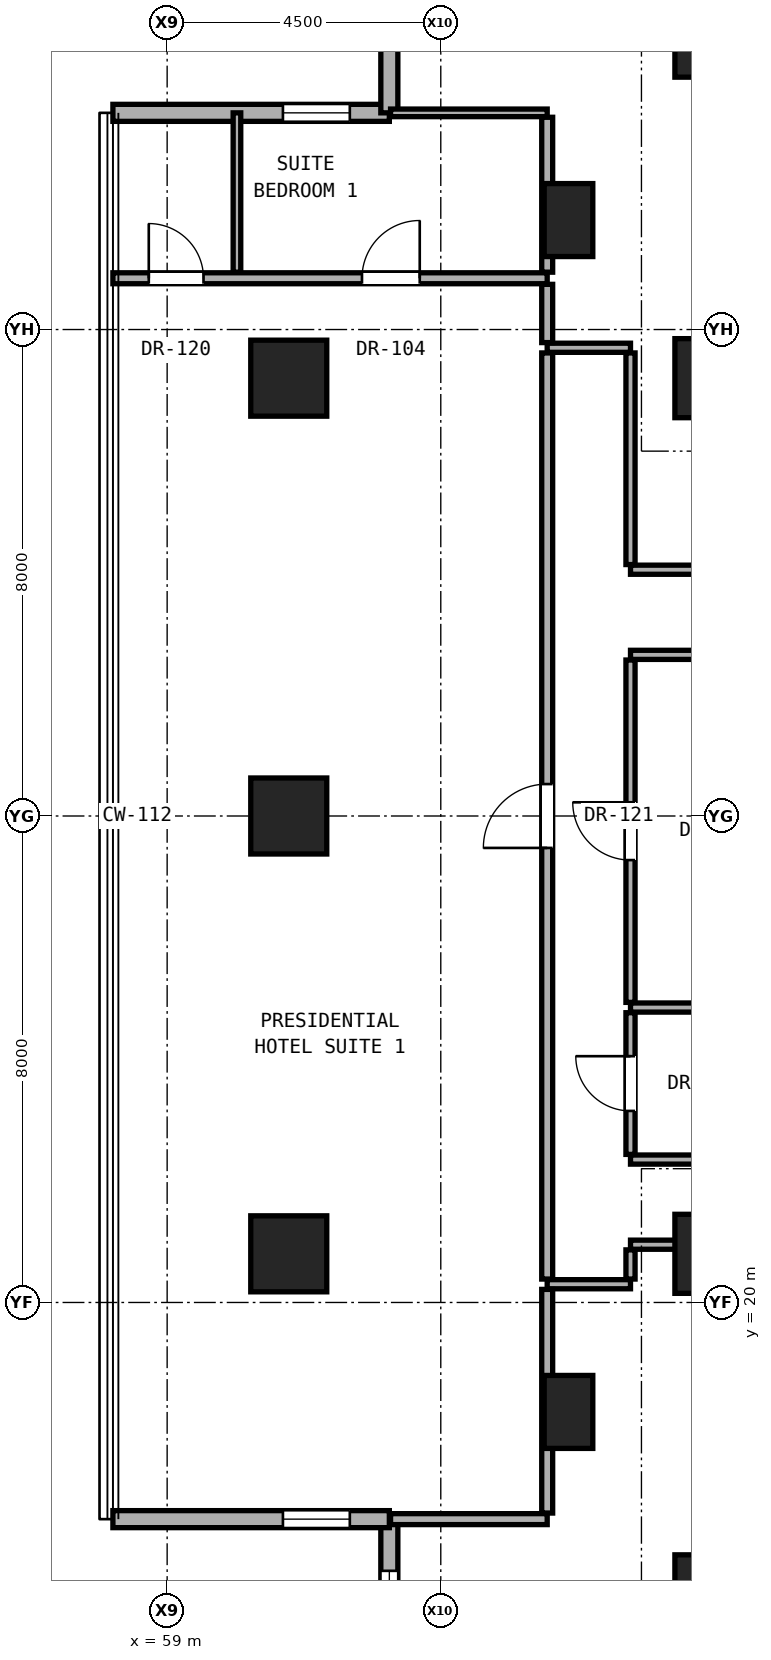
"""IFC4 building model, lengths in metres.
Left out: names, types, materials, properties, quantities, classifications, styles, units other than length and angle.
Written with IfcOpenShell. Run it as: python <this file> out.ifc"""

import sys

from ifc_helpers import new_model, si_unit, direction, frame, frame_2d, origin, origin_2d, place, context, subcontext, project, spatial, rectangle, hollow_rectangle, extrude, element, fill, save


model = new_model("IFC4")
c1 = context("Model", 3, precision=1e-05, world=origin(), true_north=direction((0.0, 1.0)))
c2 = subcontext(c1, "Body", "Model", "MODEL_VIEW")
j1 = project(units=[si_unit("LENGTHUNIT", "METRE"), si_unit("PLANEANGLEUNIT", "RADIAN")], contexts=[c1])
p1 = place(None, origin())
s1 = spatial("IfcSite", under=j1, at=p1, CompositionType="ELEMENT")
p2 = place(p1, origin())
s2 = spatial("IfcBuilding", under=s1, at=p2, CompositionType="ELEMENT")
p3 = place(p2, frame((0.0, 0.0, 65.3)))
s3 = spatial("IfcBuildingStorey", under=s2, at=p3, CompositionType="ELEMENT", Elevation=65.3)
for number, where, z_axis, x_axis in (
    (1, (68.0, 15.2, 0.0), (0.0, 0.0, 1.0), (1.0, 0.0, 0.0)),
    (2, (68.0, 20.8, 0.0), (0.0, 0.0, 1.0), (1.0, 0.0, 0.0)),
    (3, (68.0, 35.2, 0.0), (0.0, 0.0, 1.0), (1.0, 0.0, 0.0)),
    (4, (68.0, 40.8, 0.0), (0.0, 0.0, 1.0), (1.0, 0.0, 0.0)),
):
    element("IfcColumn", number, at=place(p3, frame(where, z_axis=z_axis, x_axis=x_axis)), inside=s3, PredefinedType="COLUMN", context=c2, shape_type="SweptSolid", body=[
        extrude(rectangle(XDim=1.3, YDim=1.3, at=origin_2d()), origin(), (0.0, 0.0, 1.0), 3.3),
    ])
for number, where, z_axis, x_axis in (
    (5, (61.0, 20.8, 0.0), (0.0, 0.0, 1.0), (1.0, 0.0, 0.0)),
    (6, (61.0, 28.0, 0.0), (0.0, 0.0, 1.0), (1.0, 0.0, 0.0)),
    (7, (61.0, 35.2, 0.0), (0.0, 0.0, 1.0), (1.0, 0.0, 0.0)),
):
    element("IfcColumn", number, at=place(p3, frame(where, z_axis=z_axis, x_axis=x_axis)), inside=s3, PredefinedType="COLUMN", context=c2, shape_type="SweptSolid", body=[
        extrude(hollow_rectangle(XDim=1.25, YDim=1.25, WallThickness=0.07, at=origin_2d()), origin(), (0.0, 0.0, 1.0), 3.3),
    ])
for number, where, z_axis, x_axis in (
    (8, (65.6, 18.2, 0.0), (0.0, 0.0, 1.0), (1.0, 0.0, 0.0)),
    (9, (65.6, 37.8, 0.0), (0.0, 0.0, 1.0), (1.0, 0.0, 0.0)),
):
    element("IfcColumn", number, at=place(p3, frame(where, z_axis=z_axis, x_axis=x_axis)), inside=s3, PredefinedType="PILASTER", context=c2, shape_type="SweptSolid", body=[
        extrude(rectangle(XDim=0.8, YDim=1.2, at=origin_2d()), origin(), (0.0, 0.0, 1.0), 3.3),
    ])
p4 = place(p3, frame((62.654, 16.437, 0.0), z_axis=(0.0, 0.0, 1.0), x_axis=(0.0, -1.0, 0.0)))
e10 = element("IfcWall", 10, at=p4, inside=s3, PredefinedType="SOLIDWALL", context=c2, shape_type="SweptSolid", body=[
    extrude(rectangle(XDim=4.546, YDim=0.28, at=frame_2d((2.273, 0.0))), origin(), (0.0, 0.0, 1.0), 3.04),
])
p5 = place(p4, frame((0.85, 0.0, 0.79)))
e11 = element("IfcOpeningElement", 11, at=p5, cuts=e10, PredefinedType="OPENING", context=c2, shape_type="SweptSolid", body=[
    extrude(rectangle(XDim=1.8, YDim=2.1, at=frame_2d((0.9, 1.05))), frame((0.0, 0.15, 0.0), z_axis=(0.0, -1.0, 0.0), x_axis=(1.0, 0.0, 0.0)), (0.0, 0.0, 1.0), 0.3),
])
p6 = place(p3, frame((58.108, 16.437, 0.0), z_axis=(0.0, 0.0, 1.0), x_axis=(1.0, 0.0, 0.0)))
e12 = element("IfcWall", 12, at=p6, inside=s3, PredefinedType="SOLIDWALL", context=c2, shape_type="SweptSolid", body=[
    extrude(rectangle(XDim=4.546, YDim=0.28, at=frame_2d((2.273, 0.0))), origin(), (0.0, 0.0, 1.0), 3.04),
])
p7 = place(p6, frame((2.796, 0.0, 0.85)))
e13 = element("IfcOpeningElement", 13, at=p7, cuts=e12, PredefinedType="OPENING", context=c2, shape_type="SweptSolid", body=[
    extrude(rectangle(XDim=1.1, YDim=2.0, at=frame_2d((0.55, 1.0))), frame((0.0, 0.15, 0.0), z_axis=(0.0, -1.0, 0.0), x_axis=(1.0, 0.0, 0.0)), (0.0, 0.0, 1.0), 0.3),
])
p8 = place(p3, frame((62.654, 39.563, 0.0), z_axis=(0.0, 0.0, 1.0), x_axis=(-1.0, 0.0, 0.0)))
e14 = element("IfcWall", 14, at=p8, inside=s3, PredefinedType="SOLIDWALL", context=c2, shape_type="SweptSolid", body=[
    extrude(rectangle(XDim=4.546, YDim=0.28, at=frame_2d((2.273, 0.0))), origin(), (0.0, 0.0, 1.0), 3.04),
])
p9 = place(p8, frame((0.65, 0.0, 0.85)))
e15 = element("IfcOpeningElement", 15, at=p9, cuts=e14, PredefinedType="OPENING", context=c2, shape_type="SweptSolid", body=[
    extrude(rectangle(XDim=1.1, YDim=2.0, at=frame_2d((0.55, 1.0))), frame((0.0, 0.15, 0.0), z_axis=(0.0, -1.0, 0.0), x_axis=(1.0, 0.0, 0.0)), (0.0, 0.0, 1.0), 0.3),
])
p10 = place(p3, frame((62.654, 44.109, 0.0), z_axis=(0.0, 0.0, 1.0), x_axis=(0.0, -1.0, 0.0)))
e16 = element("IfcWall", 16, at=p10, inside=s3, PredefinedType="SOLIDWALL", context=c2, shape_type="SweptSolid", body=[
    extrude(rectangle(XDim=4.546, YDim=0.28, at=frame_2d((2.273, 0.0))), origin(), (0.0, 0.0, 1.0), 3.04),
])
p11 = place(p3, frame((62.674, 16.437, 0.0), z_axis=(0.0, 0.0, 1.0), x_axis=(1.0, 0.0, 0.0)))
e17 = element("IfcWall", 17, at=p11, inside=s3, PredefinedType="PARTITIONING", context=c2, shape_type="SweptSolid", body=[
    extrude(rectangle(XDim=2.576, YDim=0.18, at=frame_2d((1.288, 0.0))), origin(), (0.0, 0.0, 1.0), 3.06),
])
p12 = place(p3, frame((65.25, 20.3, 0.0), z_axis=(0.0, 0.0, 1.0), x_axis=(1.0, 0.0, 0.0)))
e18 = element("IfcWall", 18, at=p12, inside=s3, PredefinedType="PARTITIONING", context=c2, shape_type="SweptSolid", body=[
    extrude(rectangle(XDim=1.37, YDim=0.15, at=frame_2d((0.685, 0.0))), origin(), (0.0, 0.0, 1.0), 3.06),
])
p13 = place(p3, frame((66.62, 20.95, 0.0), z_axis=(0.0, 0.0, 1.0), x_axis=(1.0, 0.0, 0.0)))
e19 = element("IfcWall", 19, at=p13, inside=s3, PredefinedType="PARTITIONING", context=c2, shape_type="SweptSolid", body=[
    extrude(rectangle(XDim=1.06, YDim=0.15, at=frame_2d((0.53, 0.0))), origin(), (0.0, 0.0, 1.0), 2.452),
])
p14 = place(p3, frame((66.62, 22.35, 0.0), z_axis=(0.0, 0.0, 1.0), x_axis=(1.0, 0.0, 0.0)))
e20 = element("IfcWall", 20, at=p14, inside=s3, PredefinedType="PARTITIONING", context=c2, shape_type="SweptSolid", body=[
    extrude(rectangle(XDim=19.63, YDim=0.15, at=frame_2d((9.815, 0.0))), origin(), (0.0, 0.0, 1.0), 2.125),
])
p15 = place(p14, frame((8.981, 0.0, 0.0)))
e21 = element("IfcOpeningElement", 21, at=p15, cuts=e20, PredefinedType="OPENING", context=c2, shape_type="SweptSolid", body=[
    extrude(rectangle(XDim=0.85, YDim=2.01, at=frame_2d((0.425, 1.005))), frame((0.0, 0.085, 0.0), z_axis=(0.0, -1.0, 0.0), x_axis=(1.0, 0.0, 0.0)), (0.0, 0.0, 1.0), 0.17),
])
p16 = place(p14, frame((16.061, 0.0, 0.0)))
e22 = element("IfcOpeningElement", 22, at=p16, cuts=e20, PredefinedType="OPENING", context=c2, shape_type="SweptSolid", body=[
    extrude(rectangle(XDim=0.85, YDim=2.01, at=frame_2d((0.425, 1.005))), frame((0.0, 0.085, 0.0), z_axis=(0.0, -1.0, 0.0), x_axis=(1.0, 0.0, 0.0)), (0.0, 0.0, 1.0), 0.17),
])
p17 = place(p3, frame((66.62, 24.85, 0.0), z_axis=(0.0, 0.0, 1.0), x_axis=(1.0, 0.0, 0.0)))
e23 = element("IfcWall", 23, at=p17, inside=s3, PredefinedType="PARTITIONING", context=c2, shape_type="SweptSolid", body=[
    extrude(rectangle(XDim=3.13, YDim=0.15, at=frame_2d((1.565, 0.0))), origin(), (0.0, 0.0, 1.0), 2.125),
])
p18 = place(p3, frame((66.62, 30.65, 0.0), z_axis=(0.0, 0.0, 1.0), x_axis=(1.0, 0.0, 0.0)))
e24 = element("IfcWall", 24, at=p18, inside=s3, PredefinedType="PARTITIONING", context=c2, shape_type="SweptSolid", body=[
    extrude(rectangle(XDim=19.63, YDim=0.15, at=frame_2d((9.815, 0.0))), origin(), (0.0, 0.0, 1.0), 2.125),
])
p19 = place(p18, frame((3.855, 0.0, 0.0)))
e25 = element("IfcOpeningElement", 25, at=p19, cuts=e24, PredefinedType="OPENING", context=c2, shape_type="SweptSolid", body=[
    extrude(rectangle(XDim=0.85, YDim=2.01, at=frame_2d((0.425, 1.005))), frame((0.0, 0.085, 0.0), z_axis=(0.0, -1.0, 0.0), x_axis=(1.0, 0.0, 0.0)), (0.0, 0.0, 1.0), 0.17),
])
p20 = place(p18, frame((8.981, 0.0, 0.0)))
e26 = element("IfcOpeningElement", 26, at=p20, cuts=e24, PredefinedType="OPENING", context=c2, shape_type="SweptSolid", body=[
    extrude(rectangle(XDim=0.85, YDim=2.01, at=frame_2d((0.425, 1.005))), frame((0.0, 0.085, 0.0), z_axis=(0.0, -1.0, 0.0), x_axis=(1.0, 0.0, 0.0)), (0.0, 0.0, 1.0), 0.17),
])
p21 = place(p18, frame((16.061, 0.0, 0.0)))
e27 = element("IfcOpeningElement", 27, at=p21, cuts=e24, PredefinedType="OPENING", context=c2, shape_type="SweptSolid", body=[
    extrude(rectangle(XDim=0.85, YDim=2.01, at=frame_2d((0.425, 1.005))), frame((0.0, 0.085, 0.0), z_axis=(0.0, -1.0, 0.0), x_axis=(1.0, 0.0, 0.0)), (0.0, 0.0, 1.0), 0.17),
])
p22 = place(p3, frame((66.62, 32.05, 0.0), z_axis=(0.0, 0.0, 1.0), x_axis=(1.0, 0.0, 0.0)))
e28 = element("IfcWall", 28, at=p22, inside=s3, PredefinedType="PARTITIONING", context=c2, shape_type="SweptSolid", body=[
    extrude(rectangle(XDim=2.18, YDim=0.15, at=frame_2d((1.09, 0.0))), origin(), (0.0, 0.0, 1.0), 2.125),
])
p23 = place(p3, frame((65.25, 35.7, 0.0), z_axis=(0.0, 0.0, 1.0), x_axis=(1.0, 0.0, 0.0)))
e29 = element("IfcWall", 29, at=p23, inside=s3, PredefinedType="PARTITIONING", context=c2, shape_type="SweptSolid", body=[
    extrude(rectangle(XDim=1.37, YDim=0.15, at=frame_2d((0.685, 0.0))), origin(), (0.0, 0.0, 1.0), 3.06),
])
p24 = place(p3, frame((58.108, 36.843, 0.0), z_axis=(0.0, 0.0, 1.0), x_axis=(1.0, 0.0, 0.0)))
e30 = element("IfcWall", 30, at=p24, inside=s3, PredefinedType="PARTITIONING", context=c2, shape_type="SweptSolid", body=[
    extrude(rectangle(XDim=7.142, YDim=0.18, at=frame_2d((3.571, 0.0))), origin(), (0.0, 0.0, 1.0), 2.436),
])
p25 = place(p24, frame((4.096, 0.0, 0.0)))
e31 = element("IfcOpeningElement", 31, at=p25, cuts=e30, PredefinedType="OPENING", context=c2, shape_type="SweptSolid", body=[
    extrude(rectangle(XDim=0.95, YDim=2.15, at=frame_2d((0.475, 1.075))), frame((0.0, 0.1, 0.0), z_axis=(0.0, -1.0, 0.0), x_axis=(1.0, 0.0, 0.0)), (0.0, 0.0, 1.0), 0.2),
])
p26 = place(p24, frame((0.59, 0.0, 0.0)))
e32 = element("IfcOpeningElement", 32, at=p26, cuts=e30, PredefinedType="OPENING", context=c2, shape_type="SweptSolid", body=[
    extrude(rectangle(XDim=0.9, YDim=2.1, at=frame_2d((0.45, 1.05))), frame((0.0, 0.1, 0.0), z_axis=(0.0, -1.0, 0.0), x_axis=(1.0, 0.0, 0.0)), (0.0, 0.0, 1.0), 0.2),
])
p27 = place(p3, frame((62.674, 39.563, 0.0), z_axis=(0.0, 0.0, 1.0), x_axis=(1.0, 0.0, 0.0)))
e33 = element("IfcWall", 33, at=p27, inside=s3, PredefinedType="PARTITIONING", context=c2, shape_type="SweptSolid", body=[
    extrude(rectangle(XDim=2.576, YDim=0.125, at=frame_2d((1.288, 0.0))), origin(), (0.0, 0.0, 1.0), 3.06),
])
p28 = place(p3, frame((60.148, 36.943, 0.0), z_axis=(0.0, 0.0, 1.0), x_axis=(0.0, 1.0, 0.0)))
e34 = element("IfcWall", 34, at=p28, inside=s3, PredefinedType="PARTITIONING", context=c2, shape_type="SweptSolid", body=[
    extrude(rectangle(XDim=2.62, YDim=0.125, at=frame_2d((1.31, 0.0))), origin(), (0.0, 0.0, 1.0), 3.06),
])
p29 = place(p3, frame((65.25, 16.537, 0.0), z_axis=(0.0, 0.0, 1.0), x_axis=(0.0, 1.0, 0.0)))
e35 = element("IfcWall", 35, at=p29, inside=s3, PredefinedType="PARTITIONING", context=c2, shape_type="SweptSolid", body=[
    extrude(rectangle(XDim=3.678, YDim=0.18, at=frame_2d((1.839, 0.0))), origin(), (0.0, 0.0, 1.0), 2.436),
])
p30 = place(p3, frame((65.25, 20.385, 0.0), z_axis=(0.0, 0.0, 1.0), x_axis=(0.0, 1.0, 0.0)))
e36 = element("IfcWall", 36, at=p30, inside=s3, PredefinedType="PARTITIONING", context=c2, shape_type="SweptSolid", body=[
    extrude(rectangle(XDim=15.23, YDim=0.18, at=frame_2d((7.615, 0.0))), origin(), (0.0, 0.0, 1.0), 2.279),
])
p31 = place(p30, frame((7.09, 0.0, 0.0)))
e37 = element("IfcOpeningElement", 37, at=p31, cuts=e36, PredefinedType="OPENING", context=c2, shape_type="SweptSolid", body=[
    extrude(rectangle(XDim=1.05, YDim=2.2, at=frame_2d((0.525, 1.1))), frame((0.0, 0.1, 0.0), z_axis=(0.0, -1.0, 0.0), x_axis=(1.0, 0.0, 0.0)), (0.0, 0.0, 1.0), 0.2),
])
p32 = place(p3, frame((65.25, 35.785, 0.0), z_axis=(0.0, 0.0, 1.0), x_axis=(0.0, 1.0, 0.0)))
e38 = element("IfcWall", 38, at=p32, inside=s3, PredefinedType="PARTITIONING", context=c2, shape_type="SweptSolid", body=[
    extrude(rectangle(XDim=0.958, YDim=0.18, at=frame_2d((0.479, 0.0))), origin(), (0.0, 0.0, 1.0), 3.06),
])
p33 = place(p3, frame((65.25, 36.943, 0.0), z_axis=(0.0, 0.0, 1.0), x_axis=(0.0, 1.0, 0.0)))
e39 = element("IfcWall", 39, at=p33, inside=s3, PredefinedType="PARTITIONING", context=c2, shape_type="SweptSolid", body=[
    extrude(rectangle(XDim=2.547, YDim=0.18, at=frame_2d((1.274, 0.0))), origin(), (0.0, 0.0, 1.0), 2.436),
])
p34 = place(p3, frame((66.62, 20.385, 0.0), z_axis=(0.0, 0.0, 1.0), x_axis=(0.0, 1.0, 0.0)))
e40 = element("IfcWall", 40, at=p34, inside=s3, PredefinedType="PARTITIONING", context=c2, shape_type="SweptSolid", body=[
    extrude(rectangle(XDim=0.48, YDim=0.15, at=frame_2d((0.24, 0.0))), origin(), (0.0, 0.0, 1.0), 2.452),
])
p35 = place(p3, frame((66.62, 22.435, 0.0), z_axis=(0.0, 0.0, 1.0), x_axis=(0.0, 1.0, 0.0)))
e41 = element("IfcWall", 41, at=p35, inside=s3, PredefinedType="PARTITIONING", context=c2, shape_type="SweptSolid", body=[
    extrude(rectangle(XDim=2.33, YDim=0.15, at=frame_2d((1.165, 0.0))), origin(), (0.0, 0.0, 1.0), 3.06),
])
p36 = place(p35, frame((0.715, 0.0, 0.0)))
e42 = element("IfcOpeningElement", 42, at=p36, cuts=e41, PredefinedType="OPENING", context=c2, shape_type="SweptSolid", body=[
    extrude(rectangle(XDim=0.9, YDim=2.1, at=frame_2d((0.45, 1.05))), frame((0.0, 0.085, 0.0), z_axis=(0.0, -1.0, 0.0), x_axis=(1.0, 0.0, 0.0)), (0.0, 0.0, 1.0), 0.17),
])
p37 = place(p3, frame((66.62, 24.935, 0.0), z_axis=(0.0, 0.0, 1.0), x_axis=(0.0, 1.0, 0.0)))
e43 = element("IfcWall", 43, at=p37, inside=s3, PredefinedType="PARTITIONING", context=c2, shape_type="SweptSolid", body=[
    extrude(rectangle(XDim=5.63, YDim=0.15, at=frame_2d((2.815, 0.0))), origin(), (0.0, 0.0, 1.0), 2.279),
])
p38 = place(p37, frame((2.34, 0.0, 0.0)))
e44 = element("IfcOpeningElement", 44, at=p38, cuts=e43, PredefinedType="OPENING", context=c2, shape_type="SweptSolid", body=[
    extrude(rectangle(XDim=0.95, YDim=2.15, at=frame_2d((0.475, 1.075))), frame((0.0, 0.085, 0.0), z_axis=(0.0, -1.0, 0.0), x_axis=(1.0, 0.0, 0.0)), (0.0, 0.0, 1.0), 0.17),
])
p39 = place(p3, frame((66.62, 32.135, 0.0), z_axis=(0.0, 0.0, 1.0), x_axis=(0.0, 1.0, 0.0)))
e45 = element("IfcWall", 45, at=p39, inside=s3, PredefinedType="PARTITIONING", context=c2, shape_type="SweptSolid", body=[
    extrude(rectangle(XDim=3.48, YDim=0.15, at=frame_2d((1.74, 0.0))), origin(), (0.0, 0.0, 1.0), 2.452),
])
p40 = place(p5, origin())
e46 = element("IfcWindow", 46, at=p40, inside=s3, PartitioningType="SINGLE_PANEL", PredefinedType="WINDOW", context=c2, shape_type="SweptSolid", body=[
    extrude(rectangle(XDim=1.8, YDim=2.1, at=frame_2d((0.9, 1.05))), frame((0.0, 0.03, 0.0), z_axis=(0.0, -1.0, 0.0), x_axis=(1.0, 0.0, 0.0)), (0.0, 0.0, 1.0), 0.06),
])
fill(e11, e46)
p41 = place(p7, origin())
e47 = element("IfcWindow", 47, at=p41, inside=s3, PartitioningType="SINGLE_PANEL", PredefinedType="WINDOW", context=c2, shape_type="SweptSolid", body=[
    extrude(rectangle(XDim=1.1, YDim=2.0, at=frame_2d((0.55, 1.0))), frame((0.0, 0.03, 0.0), z_axis=(0.0, -1.0, 0.0), x_axis=(1.0, 0.0, 0.0)), (0.0, 0.0, 1.0), 0.06),
])
fill(e13, e47)
p42 = place(p9, origin())
e48 = element("IfcWindow", 48, at=p42, inside=s3, PartitioningType="SINGLE_PANEL", PredefinedType="WINDOW", context=c2, shape_type="SweptSolid", body=[
    extrude(rectangle(XDim=1.1, YDim=2.0, at=frame_2d((0.55, 1.0))), frame((0.0, 0.03, 0.0), z_axis=(0.0, -1.0, 0.0), x_axis=(1.0, 0.0, 0.0)), (0.0, 0.0, 1.0), 0.06),
])
fill(e15, e48)
p43 = place(p36, origin())
e49 = element("IfcDoor", 49, at=p43, inside=s3, OperationType="SINGLE_SWING_RIGHT", PredefinedType="DOOR", context=c2, shape_type="SweptSolid", body=[
    extrude(rectangle(XDim=0.9, YDim=2.1, at=frame_2d((0.45, 1.05))), frame((0.0, 0.025, 0.0), z_axis=(0.0, -1.0, 0.0), x_axis=(1.0, 0.0, 0.0)), (0.0, 0.0, 1.0), 0.05),
])
fill(e42, e49)
p44 = place(p31, origin())
e50 = element("IfcDoor", 50, at=p44, inside=s3, OperationType="SINGLE_SWING_LEFT", PredefinedType="DOOR", context=c2, shape_type="SweptSolid", body=[
    extrude(rectangle(XDim=1.05, YDim=2.2, at=frame_2d((0.525, 1.1))), frame((0.0, 0.025, 0.0), z_axis=(0.0, -1.0, 0.0), x_axis=(1.0, 0.0, 0.0)), (0.0, 0.0, 1.0), 0.05),
])
fill(e37, e50)
p45 = place(p25, origin())
e51 = element("IfcDoor", 51, at=p45, inside=s3, OperationType="SINGLE_SWING_RIGHT", PredefinedType="DOOR", context=c2, shape_type="SweptSolid", body=[
    extrude(rectangle(XDim=0.95, YDim=2.15, at=frame_2d((0.475, 1.075))), frame((0.0, 0.025, 0.0), z_axis=(0.0, -1.0, 0.0), x_axis=(1.0, 0.0, 0.0)), (0.0, 0.0, 1.0), 0.05),
])
fill(e31, e51)
p46 = place(p26, origin())
e52 = element("IfcDoor", 52, at=p46, inside=s3, OperationType="SINGLE_SWING_LEFT", PredefinedType="DOOR", context=c2, shape_type="SweptSolid", body=[
    extrude(rectangle(XDim=0.9, YDim=2.1, at=frame_2d((0.45, 1.05))), frame((0.0, 0.025, 0.0), z_axis=(0.0, -1.0, 0.0), x_axis=(1.0, 0.0, 0.0)), (0.0, 0.0, 1.0), 0.05),
])
fill(e32, e52)
p47 = place(p38, origin())
e53 = element("IfcDoor", 53, at=p47, inside=s3, OperationType="SINGLE_SWING_RIGHT", PredefinedType="DOOR", context=c2, shape_type="SweptSolid", body=[
    extrude(rectangle(XDim=0.95, YDim=2.15, at=frame_2d((0.475, 1.075))), frame((0.0, 0.025, 0.0), z_axis=(0.0, -1.0, 0.0), x_axis=(1.0, 0.0, 0.0)), (0.0, 0.0, 1.0), 0.05),
])
fill(e44, e53)
save(model, sys.argv[1])
